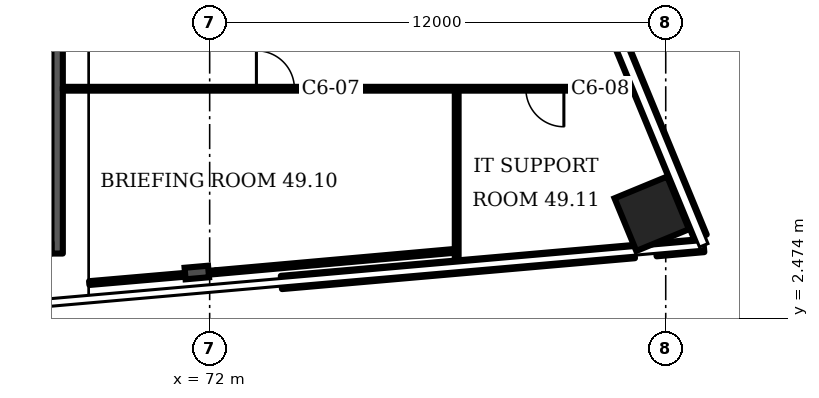
"""IFC4 building model, lengths in metres.
Left out: names, types, materials, properties, quantities, classifications, styles, units other than length and angle.
Written with IfcOpenShell. Run it as: python <this file> out.ifc"""

import sys

from ifc_helpers import new_model, si_unit, direction, frame, frame_2d, origin, origin_2d, place, context, subcontext, project, spatial, rectangle, i_section, extrude, element, fill, save


model = new_model("IFC4")
c1 = context("Model", 3, precision=1e-05, world=origin(), true_north=direction((0.0, 1.0)))
c2 = subcontext(c1, "Body", "Model", "MODEL_VIEW")
j1 = project(units=[si_unit("LENGTHUNIT", "METRE"), si_unit("PLANEANGLEUNIT", "RADIAN")], contexts=[c1])
p1 = place(None, origin())
s1 = spatial("IfcSite", under=j1, at=p1, CompositionType="ELEMENT")
p2 = place(p1, origin())
s2 = spatial("IfcBuilding", under=s1, at=p2, CompositionType="ELEMENT")
p3 = place(p2, frame((0.0, 0.0, 198.7)))
s3 = spatial("IfcBuildingStorey", under=s2, at=p3, CompositionType="ELEMENT", Elevation=198.7)
p4 = place(p3, frame((83.633, 5.231, 0.0), z_axis=(0.0, 0.0, 1.0), x_axis=(-0.381602, 0.924325, 0.0)))
e1 = element("IfcColumn", 1, at=p4, inside=s3, PredefinedType="COLUMN", context=c2, shape_type="SweptSolid", body=[
    extrude(rectangle(XDim=1.5, YDim=1.5, at=origin_2d()), origin(), (0.0, 0.0, 1.0), 3.6),
])
p5 = place(p3, frame((71.662, 3.685, 0.0), z_axis=(0.0, 0.0, 1.0), x_axis=(0.087156, -0.996198, 0.0)))
e2 = element("IfcColumn", 2, at=p5, inside=s3, PredefinedType="COLUMN", context=c2, shape_type="SweptSolid", body=[
    extrude(i_section(OverallWidth=0.305, OverallDepth=0.62, WebThickness=0.021, FlangeThickness=0.04, FilletRadius=0.027, at=origin_2d()), origin(), (0.0, 0.0, 1.0), 3.6),
])
p6 = place(p3, frame((73.887, 3.423, 0.0), z_axis=(0.0, 0.0, 1.0), x_axis=(0.996197, 0.087145, 0.0)))
e3 = element("IfcWall", 3, at=p6, inside=s3, PredefinedType="SOLIDWALL", context=c2, shape_type="SweptSolid", body=[
    extrude(rectangle(XDim=9.323, YDim=0.35, at=frame_2d((4.662, 0.0))), origin(), (0.0, 0.0, 1.0), 1.0),
])
p7 = place(p3, frame((83.745, 4.285, 0.0), z_axis=(0.0, 0.0, 1.0), x_axis=(0.996198, 0.087148, 0.0)))
e4 = element("IfcWall", 4, at=p7, inside=s3, PredefinedType="SOLIDWALL", context=c2, shape_type="SweptSolid", body=[
    extrude(rectangle(XDim=1.261, YDim=0.35, at=frame_2d((0.63, 0.0))), origin(), (0.0, 0.0, 1.0), 1.0),
])
p8 = place(p3, frame((84.916, 4.616, 0.0), z_axis=(0.0, 0.0, 1.0), x_axis=(-0.381598, 0.924328, 0.0)))
e5 = element("IfcWall", 5, at=p8, inside=s3, PredefinedType="SOLIDWALL", context=c2, shape_type="SweptSolid", body=[
    extrude(rectangle(XDim=11.361, YDim=0.35, at=frame_2d((5.68, 0.0))), origin(), (0.0, 0.0, 1.0), 1.0),
])
p9 = place(p3, frame((68.136, 8.52, 0.0), z_axis=(0.0, 0.0, 1.0), x_axis=(1.0, 0.0, 0.0)))
e6 = element("IfcWall", 6, at=p9, inside=s3, PredefinedType="PARTITIONING", context=c2, shape_type="SweptSolid", body=[
    extrude(rectangle(XDim=15.141, YDim=0.1, at=frame_2d((7.57, 0.0))), origin(), (0.0, 0.0, 1.0), 2.53),
])
p10 = place(p9, frame((5.094, 0.0, 0.0)))
e7 = element("IfcOpeningElement", 7, at=p10, cuts=e6, PredefinedType="OPENING", context=c2, shape_type="SweptSolid", body=[
    extrude(rectangle(XDim=1.0, YDim=2.1, at=frame_2d((0.5, 1.05))), frame((0.0, 0.06, 0.0), z_axis=(0.0, -1.0, 0.0), x_axis=(1.0, 0.0, 0.0)), (0.0, 0.0, 1.0), 0.12),
])
p11 = place(p9, frame((12.184, 0.0, 0.0)))
e8 = element("IfcOpeningElement", 8, at=p11, cuts=e6, PredefinedType="OPENING", context=c2, shape_type="SweptSolid", body=[
    extrude(rectangle(XDim=1.0, YDim=2.1, at=frame_2d((0.5, 1.05))), frame((0.0, 0.06, 0.0), z_axis=(0.0, -1.0, 0.0), x_axis=(1.0, 0.0, 0.0)), (0.0, 0.0, 1.0), 0.12),
])
p12 = place(p3, frame((68.831, 3.407, 0.0), z_axis=(0.0, 0.0, 1.0), x_axis=(0.996283, 0.086167, 0.0)))
e9 = element("IfcWall", 9, at=p12, inside=s3, PredefinedType="PARTITIONING", context=c2, shape_type="SweptSolid", body=[
    extrude(rectangle(XDim=3.346, YDim=0.1, at=frame_2d((1.673, 0.0))), origin(), (0.0, 0.0, 1.0), 2.53),
])
p13 = place(p3, frame((72.165, 3.695, 0.0), z_axis=(0.0, 0.0, 1.0), x_axis=(0.996066, 0.08865, 0.0)))
e10 = element("IfcWall", 10, at=p13, inside=s3, PredefinedType="PARTITIONING", context=c2, shape_type="SweptSolid", body=[
    extrude(rectangle(XDim=6.315, YDim=0.1, at=frame_2d((3.157, 0.0))), origin(), (0.0, 0.0, 1.0), 2.53),
])
p14 = place(p3, frame((78.5, 3.87, 0.0), z_axis=(0.0, 0.0, 1.0), x_axis=(0.0, 1.0, 0.0)))
e11 = element("IfcWall", 11, at=p14, inside=s3, PredefinedType="PARTITIONING", context=c2, shape_type="SweptSolid", body=[
    extrude(rectangle(XDim=4.65, YDim=0.1, at=frame_2d((2.325, 0.0))), origin(), (0.0, 0.0, 1.0), 2.53),
])
p15 = place(p3, frame((67.986, 4.184, 0.0), z_axis=(0.0, 0.0, 1.0), x_axis=(0.0, 1.0, 0.0)))
e12 = element("IfcWall", 12, at=p15, inside=s3, PredefinedType="SHEAR", context=c2, shape_type="SweptSolid", body=[
    extrude(rectangle(XDim=7.5, YDim=0.3, at=frame_2d((3.75, 0.0))), origin(), (0.0, 0.0, 1.0), 3.15),
])
p16 = place(p10, origin())
e13 = element("IfcDoor", 13, at=p16, inside=s3, OperationType="SINGLE_SWING_LEFT", PredefinedType="DOOR", context=c2, shape_type="SweptSolid", body=[
    extrude(rectangle(XDim=1.0, YDim=2.1, at=frame_2d((0.5, 1.05))), frame((0.0, 0.025, 0.0), z_axis=(0.0, -1.0, 0.0), x_axis=(1.0, 0.0, 0.0)), (0.0, 0.0, 1.0), 0.05),
])
fill(e7, e13)
p17 = place(p11, origin())
e14 = element("IfcDoor", 14, at=p17, inside=s3, OperationType="SINGLE_SWING_RIGHT", PredefinedType="DOOR", context=c2, shape_type="SweptSolid", body=[
    extrude(rectangle(XDim=1.0, YDim=2.1, at=frame_2d((0.5, 1.05))), frame((0.0, 0.025, 0.0), z_axis=(0.0, -1.0, 0.0), x_axis=(1.0, 0.0, 0.0)), (0.0, 0.0, 1.0), 0.05),
])
fill(e8, e14)
save(model, sys.argv[1])
